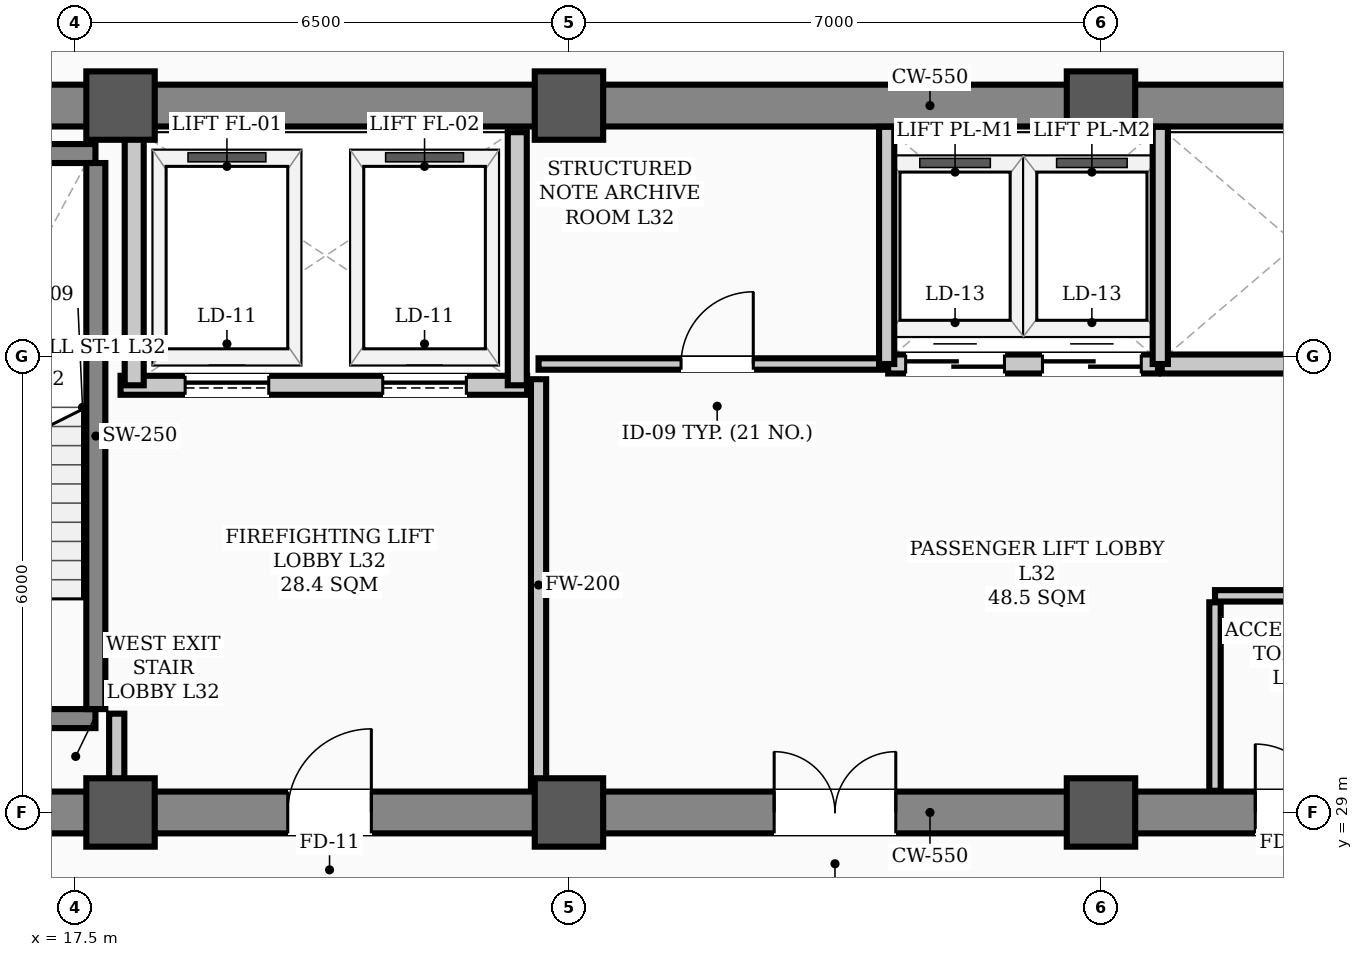
"""IFC4 building model, lengths in metres.
Left out: names, types, materials, properties, quantities, classifications, styles, units other than length and angle.
Written with IfcOpenShell. Run it as: python <this file> out.ifc"""

import sys

from ifc_helpers import new_model, si_unit, direction, frame, frame_2d, origin, origin_2d, place, context, subcontext, project, spatial, rectangle, hollow_rectangle, extrude, element, fill, save


model = new_model("IFC4")
c1 = context("Model", 3, precision=1e-05, world=origin(), true_north=direction((0.0, 1.0)))
c2 = subcontext(c1, "Body", "Model", "MODEL_VIEW")
j1 = project(units=[si_unit("LENGTHUNIT", "METRE"), si_unit("PLANEANGLEUNIT", "RADIAN")], contexts=[c1])
p1 = place(None, origin())
s1 = spatial("IfcSite", under=j1, at=p1, CompositionType="ELEMENT")
p2 = place(p1, origin())
s2 = spatial("IfcBuilding", under=s1, at=p2, CompositionType="ELEMENT")
p3 = place(p2, frame((0.0, 0.0, 130.5)))
s3 = spatial("IfcBuildingStorey", under=s2, at=p3, CompositionType="ELEMENT", Elevation=130.5)
for number, where, z_axis, x_axis in (
    (1, (18.1, 29.0, 0.0), (0.0, 0.0, 1.0), (1.0, 0.0, 0.0)),
    (2, (18.1, 38.3, 0.0), (0.0, 0.0, 1.0), (1.0, 0.0, 0.0)),
    (3, (24.0, 29.0, 0.0), (0.0, 0.0, 1.0), (1.0, 0.0, 0.0)),
    (4, (24.0, 38.3, 0.0), (0.0, 0.0, 1.0), (1.0, 0.0, 0.0)),
    (5, (31.0, 29.0, 0.0), (0.0, 0.0, 1.0), (1.0, 0.0, 0.0)),
    (6, (31.0, 38.3, 0.0), (0.0, 0.0, 1.0), (1.0, 0.0, 0.0)),
):
    element("IfcColumn", number, at=place(p3, frame(where, z_axis=z_axis, x_axis=x_axis)), inside=s3, PredefinedType="COLUMN", context=c2, shape_type="SweptSolid", body=[
        extrude(hollow_rectangle(XDim=0.9, YDim=0.9, WallThickness=0.035, InnerFilletRadius=0.017, OuterFilletRadius=0.052, at=origin_2d()), origin(), (0.0, 0.0, 1.0), 3.9),
    ])
p4 = place(p3, frame((13.5, 29.0, 0.0), z_axis=(0.0, 0.0, 1.0), x_axis=(1.0, 0.0, 0.0)))
e7 = element("IfcWall", 7, at=p4, inside=s3, PredefinedType="SHEAR", context=c2, shape_type="SweptSolid", body=[
    extrude(rectangle(XDim=30.5, YDim=0.55, at=frame_2d((15.25, 0.0))), origin(), (0.0, 0.0, 1.0), 3.72),
])
p5 = place(p4, frame((1.75, 0.0, 0.0)))
e8 = element("IfcOpeningElement", 8, at=p5, cuts=e7, PredefinedType="OPENING", context=c2, shape_type="SweptSolid", body=[
    extrude(rectangle(XDim=1.1, YDim=2.08, at=frame_2d((0.55, 1.04))), frame((0.0, 0.285, 0.0), z_axis=(0.0, -1.0, 0.0), x_axis=(1.0, 0.0, 0.0)), (0.0, 0.0, 1.0), 0.57),
])
p6 = place(p4, frame((26.7, 0.0, 0.0)))
e9 = element("IfcOpeningElement", 9, at=p6, cuts=e7, PredefinedType="OPENING", context=c2, shape_type="SweptSolid", body=[
    extrude(rectangle(XDim=1.1, YDim=2.08, at=frame_2d((0.55, 1.04))), frame((0.0, 0.285, 0.0), z_axis=(0.0, -1.0, 0.0), x_axis=(1.0, 0.0, 0.0)), (0.0, 0.0, 1.0), 0.57),
])
p7 = place(p4, frame((6.8, 0.0, 0.0)))
e10 = element("IfcOpeningElement", 10, at=p7, cuts=e7, PredefinedType="OPENING", context=c2, shape_type="SweptSolid", body=[
    extrude(rectangle(XDim=1.1, YDim=2.08, at=frame_2d((0.55, 1.04))), frame((0.0, 0.285, 0.0), z_axis=(0.0, -1.0, 0.0), x_axis=(1.0, 0.0, 0.0)), (0.0, 0.0, 1.0), 0.57),
])
p8 = place(p4, frame((13.2, 0.0, 0.0)))
e11 = element("IfcOpeningElement", 11, at=p8, cuts=e7, PredefinedType="OPENING", context=c2, shape_type="SweptSolid", body=[
    extrude(rectangle(XDim=1.6, YDim=2.08, at=frame_2d((0.8, 1.04))), frame((0.0, 0.285, 0.0), z_axis=(0.0, -1.0, 0.0), x_axis=(1.0, 0.0, 0.0)), (0.0, 0.0, 1.0), 0.57),
])
p9 = place(p4, frame((19.53, 0.0, 0.0)))
e12 = element("IfcOpeningElement", 12, at=p9, cuts=e7, PredefinedType="OPENING", context=c2, shape_type="SweptSolid", body=[
    extrude(rectangle(XDim=0.9, YDim=2.08, at=frame_2d((0.45, 1.04))), frame((0.0, 0.285, 0.0), z_axis=(0.0, -1.0, 0.0), x_axis=(1.0, 0.0, 0.0)), (0.0, 0.0, 1.0), 0.57),
])
p10 = place(p4, frame((21.57, 0.0, 0.0)))
e13 = element("IfcOpeningElement", 13, at=p10, cuts=e7, PredefinedType="OPENING", context=c2, shape_type="SweptSolid", body=[
    extrude(rectangle(XDim=0.9, YDim=2.08, at=frame_2d((0.45, 1.04))), frame((0.0, 0.285, 0.0), z_axis=(0.0, -1.0, 0.0), x_axis=(1.0, 0.0, 0.0)), (0.0, 0.0, 1.0), 0.57),
])
p11 = place(p3, frame((13.5, 38.3, 0.0), z_axis=(0.0, 0.0, 1.0), x_axis=(1.0, 0.0, 0.0)))
e14 = element("IfcWall", 14, at=p11, inside=s3, PredefinedType="SHEAR", context=c2, shape_type="SweptSolid", body=[
    extrude(rectangle(XDim=30.5, YDim=0.55, at=frame_2d((15.25, 0.0))), origin(), (0.0, 0.0, 1.0), 3.72),
])
p12 = place(p3, frame((14.43, 30.235, 0.0), z_axis=(0.0, 0.0, 1.0), x_axis=(1.0, 0.0, 0.0)))
e15 = element("IfcWall", 15, at=p12, inside=s3, PredefinedType="STANDARD", context=c2, shape_type="SweptSolid", body=[
    extrude(rectangle(XDim=3.34, YDim=0.25, at=frame_2d((1.67, 0.0))), origin(), (0.0, 0.0, 1.0), 3.72),
])
p13 = place(p12, frame((1.1, 0.0, 0.0)))
e16 = element("IfcOpeningElement", 16, at=p13, cuts=e15, PredefinedType="OPENING", context=c2, shape_type="SweptSolid", body=[
    extrude(rectangle(XDim=1.1, YDim=2.08, at=frame_2d((0.55, 1.04))), frame((0.0, 0.135, 0.0), z_axis=(0.0, -1.0, 0.0), x_axis=(1.0, 0.0, 0.0)), (0.0, 0.0, 1.0), 0.27),
])
p14 = place(p3, frame((14.43, 37.669, 0.0), z_axis=(0.0, 0.0, 1.0), x_axis=(1.0, 0.0, 0.0)))
e17 = element("IfcWall", 17, at=p14, inside=s3, PredefinedType="STANDARD", context=c2, shape_type="SweptSolid", body=[
    extrude(rectangle(XDim=3.34, YDim=0.25, at=frame_2d((1.67, 0.0))), origin(), (0.0, 0.0, 1.0), 3.72),
])
p15 = place(p3, frame((17.775, 30.36, 0.0), z_axis=(0.0, 0.0, 1.0), x_axis=(0.0, 1.0, 0.0)))
e18 = element("IfcWall", 18, at=p15, inside=s3, PredefinedType="STANDARD", context=c2, shape_type="SweptSolid", body=[
    extrude(rectangle(XDim=7.184, YDim=0.25, at=frame_2d((3.592, 0.0))), origin(), (0.0, 0.0, 1.0), 3.72),
])
p16 = place(p3, frame((18.1, 34.62, 0.0), z_axis=(0.0, 0.0, 1.0), x_axis=(1.0, 0.0, 0.0)))
e19 = element("IfcWall", 19, at=p16, inside=s3, PredefinedType="STANDARD", context=c2, shape_type="SweptSolid", body=[
    extrude(rectangle(XDim=5.35, YDim=0.25, at=frame_2d((2.675, 0.0))), origin(), (0.0, 0.0, 1.0), 3.72),
])
p17 = place(p16, frame((0.85, 0.0, 0.0)))
e20 = element("IfcOpeningElement", 20, at=p17, cuts=e19, PredefinedType="OPENING", context=c2, shape_type="SweptSolid", body=[
    extrude(rectangle(XDim=1.1, YDim=2.08, at=frame_2d((0.55, 1.04))), frame((0.0, 0.135, 0.0), z_axis=(0.0, -1.0, 0.0), x_axis=(1.0, 0.0, 0.0)), (0.0, 0.0, 1.0), 0.27),
])
p18 = place(p16, frame((3.45, 0.0, 0.0)))
e21 = element("IfcOpeningElement", 21, at=p18, cuts=e19, PredefinedType="OPENING", context=c2, shape_type="SweptSolid", body=[
    extrude(rectangle(XDim=1.1, YDim=2.08, at=frame_2d((0.55, 1.04))), frame((0.0, 0.135, 0.0), z_axis=(0.0, -1.0, 0.0), x_axis=(1.0, 0.0, 0.0)), (0.0, 0.0, 1.0), 0.27),
])
for number, where, z_axis, x_axis in (
    (22, (18.28, 34.62, 0.0), (0.0, 0.0, 1.0), (0.0, 1.0, 0.0)),
    (23, (23.32, 34.62, 0.0), (0.0, 0.0, 1.0), (0.0, 1.0, 0.0)),
):
    element("IfcWall", number, at=place(p3, frame(where, z_axis=z_axis, x_axis=x_axis)), inside=s3, PredefinedType="STANDARD", context=c2, shape_type="SweptSolid", body=[
        extrude(rectangle(XDim=3.33, YDim=0.25, at=frame_2d((1.665, 0.0))), origin(), (0.0, 0.0, 1.0), 3.72),
    ])
p19 = place(p3, frame((28.2, 34.9, 0.0), z_axis=(0.0, 0.0, 1.0), x_axis=(1.0, 0.0, 0.0)))
e24 = element("IfcWall", 24, at=p19, inside=s3, PredefinedType="STANDARD", context=c2, shape_type="SweptSolid", body=[
    extrude(rectangle(XDim=3.55, YDim=0.25, at=frame_2d((1.775, 0.0))), origin(), (0.0, 0.0, 1.0), 3.72),
])
p20 = place(p19, frame((0.23, 0.0, 0.0)))
e25 = element("IfcOpeningElement", 25, at=p20, cuts=e24, PredefinedType="OPENING", context=c2, shape_type="SweptSolid", body=[
    extrude(rectangle(XDim=1.3, YDim=2.08, at=frame_2d((0.65, 1.04))), frame((0.0, 0.135, 0.0), z_axis=(0.0, -1.0, 0.0), x_axis=(1.0, 0.0, 0.0)), (0.0, 0.0, 1.0), 0.27),
])
p21 = place(p19, frame((2.03, 0.0, 0.0)))
e26 = element("IfcOpeningElement", 26, at=p21, cuts=e24, PredefinedType="OPENING", context=c2, shape_type="SweptSolid", body=[
    extrude(rectangle(XDim=1.3, YDim=2.08, at=frame_2d((0.65, 1.04))), frame((0.0, 0.135, 0.0), z_axis=(0.0, -1.0, 0.0), x_axis=(1.0, 0.0, 0.0)), (0.0, 0.0, 1.0), 0.27),
])
p22 = place(p3, frame((31.8, 34.9, 0.0), z_axis=(0.0, 0.0, 1.0), x_axis=(1.0, 0.0, 0.0)))
e27 = element("IfcWall", 27, at=p22, inside=s3, PredefinedType="STANDARD", context=c2, shape_type="SweptSolid", body=[
    extrude(rectangle(XDim=3.6, YDim=0.25, at=frame_2d((1.8, 0.0))), origin(), (0.0, 0.0, 1.0), 3.72),
])
p23 = place(p3, frame((23.6, 34.9, 0.0), z_axis=(0.0, 0.0, 1.0), x_axis=(1.0, 0.0, 0.0)))
e28 = element("IfcWall", 28, at=p23, inside=s3, PredefinedType="PARTITIONING", context=c2, shape_type="SweptSolid", body=[
    extrude(rectangle(XDim=4.58, YDim=0.15, at=frame_2d((2.29, 0.0))), origin(), (0.0, 0.0, 1.0), 3.72),
])
p24 = place(p23, frame((1.875, 0.0, 0.0)))
e29 = element("IfcOpeningElement", 29, at=p24, cuts=e28, PredefinedType="OPENING", context=c2, shape_type="SweptSolid", body=[
    extrude(rectangle(XDim=0.95, YDim=2.08, at=frame_2d((0.475, 1.04))), frame((0.0, 0.085, 0.0), z_axis=(0.0, -1.0, 0.0), x_axis=(1.0, 0.0, 0.0)), (0.0, 0.0, 1.0), 0.17),
])
p25 = place(p3, frame((32.5, 31.85, 0.0), z_axis=(0.0, 0.0, 1.0), x_axis=(1.0, 0.0, 0.0)))
e30 = element("IfcWall", 30, at=p25, inside=s3, PredefinedType="PARTITIONING", context=c2, shape_type="SweptSolid", body=[
    extrude(rectangle(XDim=4.1, YDim=0.15, at=frame_2d((2.05, 0.0))), origin(), (0.0, 0.0, 1.0), 3.72),
])
p26 = place(p3, frame((18.05, 29.285, 0.0), z_axis=(0.0, 0.0, 1.0), x_axis=(0.0, 1.0, 0.0)))
e31 = element("IfcWall", 31, at=p26, inside=s3, PredefinedType="STANDARD", context=c2, shape_type="SweptSolid", body=[
    extrude(rectangle(XDim=1.015, YDim=0.2, at=frame_2d((0.508, 0.0))), origin(), (0.0, 0.0, 1.0), 3.3),
])
p27 = place(p3, frame((23.6, 29.285, 0.0), z_axis=(0.0, 0.0, 1.0), x_axis=(0.0, 1.0, 0.0)))
e32 = element("IfcWall", 32, at=p27, inside=s3, PredefinedType="STANDARD", context=c2, shape_type="SweptSolid", body=[
    extrude(rectangle(XDim=5.415, YDim=0.2, at=frame_2d((2.708, 0.0))), origin(), (0.0, 0.0, 1.0), 3.1),
])
p28 = place(p3, frame((32.5, 29.285, 0.0), z_axis=(0.0, 0.0, 1.0), x_axis=(0.0, 1.0, 0.0)))
e33 = element("IfcWall", 33, at=p28, inside=s3, PredefinedType="PARTITIONING", context=c2, shape_type="SweptSolid", body=[
    extrude(rectangle(XDim=2.48, YDim=0.15, at=frame_2d((1.24, 0.0))), origin(), (0.0, 0.0, 1.0), 3.3),
])
for number, where, z_axis, x_axis in (
    (34, (28.18, 34.9, 0.0), (0.0, 0.0, 1.0), (0.0, 1.0, 0.0)),
    (35, (31.78, 34.9, 0.0), (0.0, 0.0, 1.0), (0.0, 1.0, 0.0)),
):
    element("IfcWall", number, at=place(p3, frame(where, z_axis=z_axis, x_axis=x_axis)), inside=s3, PredefinedType="STANDARD", context=c2, shape_type="SweptSolid", body=[
        extrude(rectangle(XDim=3.12, YDim=0.2, at=frame_2d((1.56, 0.0))), origin(), (0.0, 0.0, 1.0), 3.72),
    ])
p29 = place(p7, origin())
e36 = element("IfcDoor", 36, at=p29, inside=s3, OperationType="SINGLE_SWING_RIGHT", PredefinedType="DOOR", context=c2, shape_type="SweptSolid", body=[
    extrude(rectangle(XDim=1.1, YDim=2.08, at=frame_2d((0.55, 1.04))), frame((0.0, 0.025, 0.0), z_axis=(0.0, -1.0, 0.0), x_axis=(1.0, 0.0, 0.0)), (0.0, 0.0, 1.0), 0.05),
])
fill(e10, e36)
p30 = place(p8, origin())
e37 = element("IfcDoor", 37, at=p30, inside=s3, OperationType="DOUBLE_DOOR_SINGLE_SWING", PredefinedType="DOOR", context=c2, shape_type="SweptSolid", body=[
    extrude(rectangle(XDim=1.6, YDim=2.08, at=frame_2d((0.8, 1.04))), frame((0.0, 0.025, 0.0), z_axis=(0.0, -1.0, 0.0), x_axis=(1.0, 0.0, 0.0)), (0.0, 0.0, 1.0), 0.05),
])
fill(e11, e37)
p31 = place(p24, origin())
e38 = element("IfcDoor", 38, at=p31, inside=s3, OperationType="SINGLE_SWING_RIGHT", PredefinedType="DOOR", context=c2, shape_type="SweptSolid", body=[
    extrude(rectangle(XDim=0.95, YDim=2.08, at=frame_2d((0.475, 1.04))), frame((0.0, 0.025, 0.0), z_axis=(0.0, -1.0, 0.0), x_axis=(1.0, 0.0, 0.0)), (0.0, 0.0, 1.0), 0.05),
])
fill(e29, e38)
p32 = place(p9, origin())
e39 = element("IfcDoor", 39, at=p32, inside=s3, OperationType="SINGLE_SWING_LEFT", PredefinedType="DOOR", context=c2, shape_type="SweptSolid", body=[
    extrude(rectangle(XDim=0.9, YDim=2.08, at=frame_2d((0.45, 1.04))), frame((0.0, 0.025, 0.0), z_axis=(0.0, -1.0, 0.0), x_axis=(1.0, 0.0, 0.0)), (0.0, 0.0, 1.0), 0.05),
])
fill(e12, e39)
p33 = place(p17, origin())
e40 = element("IfcDoor", 40, at=p33, inside=s3, OperationType="SLIDING_TO_LEFT", PredefinedType="DOOR", context=c2, shape_type="SweptSolid", body=[
    extrude(rectangle(XDim=1.1, YDim=2.08, at=frame_2d((0.55, 1.04))), frame((0.0, 0.025, 0.0), z_axis=(0.0, -1.0, 0.0), x_axis=(1.0, 0.0, 0.0)), (0.0, 0.0, 1.0), 0.05),
])
fill(e20, e40)
p34 = place(p18, origin())
e41 = element("IfcDoor", 41, at=p34, inside=s3, OperationType="SLIDING_TO_LEFT", PredefinedType="DOOR", context=c2, shape_type="SweptSolid", body=[
    extrude(rectangle(XDim=1.1, YDim=2.08, at=frame_2d((0.55, 1.04))), frame((0.0, 0.025, 0.0), z_axis=(0.0, -1.0, 0.0), x_axis=(1.0, 0.0, 0.0)), (0.0, 0.0, 1.0), 0.05),
])
fill(e21, e41)
p35 = place(p20, origin())
e42 = element("IfcDoor", 42, at=p35, inside=s3, OperationType="DOUBLE_DOOR_SLIDING", PredefinedType="DOOR", context=c2, shape_type="SweptSolid", body=[
    extrude(rectangle(XDim=1.3, YDim=2.08, at=frame_2d((0.65, 1.04))), frame((0.0, 0.025, 0.0), z_axis=(0.0, -1.0, 0.0), x_axis=(1.0, 0.0, 0.0)), (0.0, 0.0, 1.0), 0.05),
])
fill(e25, e42)
p36 = place(p21, origin())
e43 = element("IfcDoor", 43, at=p36, inside=s3, OperationType="DOUBLE_DOOR_SLIDING", PredefinedType="DOOR", context=c2, shape_type="SweptSolid", body=[
    extrude(rectangle(XDim=1.3, YDim=2.08, at=frame_2d((0.65, 1.04))), frame((0.0, 0.025, 0.0), z_axis=(0.0, -1.0, 0.0), x_axis=(1.0, 0.0, 0.0)), (0.0, 0.0, 1.0), 0.05),
])
fill(e26, e43)
save(model, sys.argv[1])
